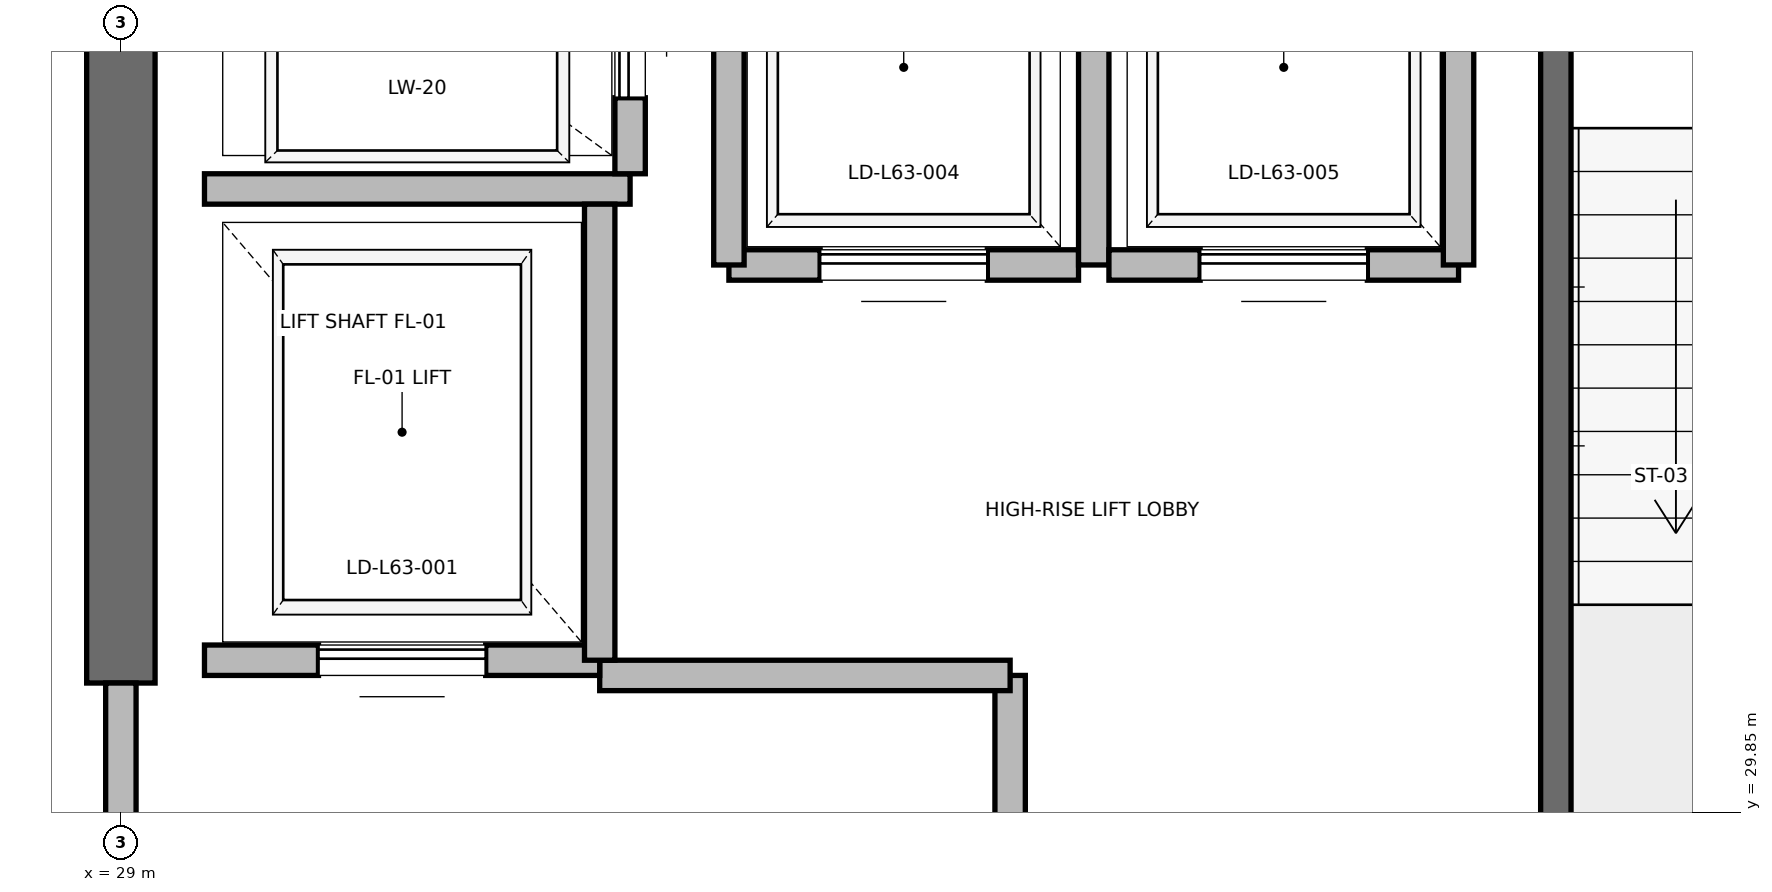
"""IFC4 building model, lengths in metres.
Left out: names, types, materials, properties, quantities, classifications, styles, units other than length and angle.
Written with IfcOpenShell. Run it as: python <this file> out.ifc"""

import sys

from ifc_helpers import new_model, si_unit, direction, frame, frame_2d, origin, place, context, subcontext, project, spatial, rectangle, extrude, element, fill, save


model = new_model("IFC4")
c1 = context("Model", 3, precision=1e-05, world=origin(), true_north=direction((0.0, 1.0)))
c2 = subcontext(c1, "Body", "Model", "MODEL_VIEW")
j1 = project(units=[si_unit("LENGTHUNIT", "METRE"), si_unit("PLANEANGLEUNIT", "RADIAN")], contexts=[c1])
p1 = place(None, origin())
s1 = spatial("IfcSite", under=j1, at=p1, CompositionType="ELEMENT")
p2 = place(p1, origin())
s2 = spatial("IfcBuilding", under=s1, at=p2, CompositionType="ELEMENT")
p3 = place(p2, frame((0.0, 0.0, 271.2)))
s3 = spatial("IfcBuildingStorey", under=s2, at=p3, CompositionType="ELEMENT", Elevation=271.2)
p4 = place(p3, frame((29.0, 30.7, 0.0), z_axis=(0.0, 0.0, 1.0), x_axis=(0.0, 1.0, 0.0)))
e1 = element("IfcWall", 1, at=p4, inside=s3, PredefinedType="SHEAR", context=c2, shape_type="SweptSolid", body=[
    extrude(rectangle(XDim=5.8, YDim=0.45, at=frame_2d((2.9, 0.0))), origin(), (0.0, 0.0, 1.0), 3.785),
])
p5 = place(p3, frame((38.44, 27.38, 0.0), z_axis=(0.0, 0.0, 1.0), x_axis=(0.0, 1.0, 0.0)))
e2 = element("IfcWall", 2, at=p5, inside=s3, PredefinedType="SOLIDWALL", context=c2, shape_type="SweptSolid", body=[
    extrude(rectangle(XDim=8.87, YDim=0.2, at=frame_2d((4.435, 0.0))), origin(), (0.0, 0.0, 1.0), 3.785),
])
p6 = place(p3, frame((34.85, 27.38, 0.0), z_axis=(0.0, 0.0, 1.0), x_axis=(0.0, 1.0, 0.0)))
e3 = element("IfcWall", 3, at=p6, inside=s3, PredefinedType="PARTITIONING", context=c2, shape_type="SweptSolid", body=[
    extrude(rectangle(XDim=3.37, YDim=0.2, at=frame_2d((1.685, 0.0))), origin(), (0.0, 0.0, 1.0), 3.785),
])
p7 = place(p6, frame((1.11, 0.0, 0.0)))
e4 = element("IfcOpeningElement", 4, at=p7, cuts=e3, PredefinedType="OPENING", context=c2, shape_type="SweptSolid", body=[
    extrude(rectangle(XDim=1.15, YDim=2.2, at=frame_2d((0.575, 1.1))), frame((0.0, 0.1, 0.0), z_axis=(0.0, -1.0, 0.0), x_axis=(1.0, 0.0, 0.0)), (0.0, 0.0, 1.0), 0.2),
])
p8 = place(p3, frame((29.0, 27.3, 0.0), z_axis=(0.0, 0.0, 1.0), x_axis=(0.0, 1.0, 0.0)))
e5 = element("IfcWall", 5, at=p8, inside=s3, PredefinedType="PARTITIONING", context=c2, shape_type="SweptSolid", body=[
    extrude(rectangle(XDim=3.4, YDim=0.2, at=frame_2d((1.7, 0.0))), origin(), (0.0, 0.0, 1.0), 2.865),
])
p9 = place(p8, frame((1.125, 0.0, 0.0)))
e6 = element("IfcOpeningElement", 6, at=p9, cuts=e5, PredefinedType="OPENING", context=c2, shape_type="SweptSolid", body=[
    extrude(rectangle(XDim=1.15, YDim=2.2, at=frame_2d((0.575, 1.1))), frame((0.0, 0.1, 0.0), z_axis=(0.0, -1.0, 0.0), x_axis=(1.0, 0.0, 0.0)), (0.0, 0.0, 1.0), 0.2),
])
p10 = place(p3, frame((32.15, 30.75, 0.0), z_axis=(0.0, 0.0, 1.0), x_axis=(1.0, 0.0, 0.0)))
e7 = element("IfcWall", 7, at=p10, inside=s3, PredefinedType="PARTITIONING", context=c2, shape_type="SweptSolid", body=[
    extrude(rectangle(XDim=2.7, YDim=0.2, at=frame_2d((1.35, 0.0))), origin(), (0.0, 0.0, 1.0), 3.785),
])
p11 = place(p3, frame((29.55, 30.85, 0.0), z_axis=(0.0, 0.0, 1.0), x_axis=(1.0, 0.0, 0.0)))
e8 = element("IfcWall", 8, at=p11, inside=s3, PredefinedType="SOLIDWALL", context=c2, shape_type="SweptSolid", body=[
    extrude(rectangle(XDim=2.6, YDim=0.2, at=frame_2d((1.3, 0.0))), origin(), (0.0, 0.0, 1.0), 2.865),
])
p12 = place(p11, frame((0.75, 0.0, 0.0)))
e9 = element("IfcOpeningElement", 9, at=p12, cuts=e8, PredefinedType="OPENING", context=c2, shape_type="SweptSolid", body=[
    extrude(rectangle(XDim=1.1, YDim=2.2, at=frame_2d((0.55, 1.1))), frame((0.0, 0.1, 0.0), z_axis=(0.0, -1.0, 0.0), x_axis=(1.0, 0.0, 0.0)), (0.0, 0.0, 1.0), 0.2),
])
p13 = place(p3, frame((29.55, 33.95, 0.0), z_axis=(0.0, 0.0, 1.0), x_axis=(1.0, 0.0, 0.0)))
e10 = element("IfcWall", 10, at=p13, inside=s3, PredefinedType="SOLIDWALL", context=c2, shape_type="SweptSolid", body=[
    extrude(rectangle(XDim=2.8, YDim=0.2, at=frame_2d((1.4, 0.0))), origin(), (0.0, 0.0, 1.0), 3.785),
])
p14 = place(p3, frame((32.15, 30.85, 0.0), z_axis=(0.0, 0.0, 1.0), x_axis=(0.0, 1.0, 0.0)))
e11 = element("IfcWall", 11, at=p14, inside=s3, PredefinedType="SOLIDWALL", context=c2, shape_type="SweptSolid", body=[
    extrude(rectangle(XDim=3.0, YDim=0.2, at=frame_2d((1.5, 0.0))), origin(), (0.0, 0.0, 1.0), 3.785),
])
p15 = place(p3, frame((32.35, 34.05, 0.0), z_axis=(0.0, 0.0, 1.0), x_axis=(0.0, 1.0, 0.0)))
e12 = element("IfcWall", 12, at=p15, inside=s3, PredefinedType="SOLIDWALL", context=c2, shape_type="SweptSolid", body=[
    extrude(rectangle(XDim=2.1, YDim=0.2, at=frame_2d((1.05, 0.0))), origin(), (0.0, 0.0, 1.0), 3.785),
])
p16 = place(p15, frame((0.5, 0.0, 0.0)))
e13 = element("IfcOpeningElement", 13, at=p16, cuts=e12, PredefinedType="OPENING", context=c2, shape_type="SweptSolid", body=[
    extrude(rectangle(XDim=1.1, YDim=2.2, at=frame_2d((0.55, 1.1))), frame((0.0, 0.1, 0.0), z_axis=(0.0, -1.0, 0.0), x_axis=(1.0, 0.0, 0.0)), (0.0, 0.0, 1.0), 0.2),
])
p17 = place(p3, frame((33.0, 33.45, 0.0), z_axis=(0.0, 0.0, 1.0), x_axis=(1.0, 0.0, 0.0)))
e14 = element("IfcWall", 14, at=p17, inside=s3, PredefinedType="SOLIDWALL", context=c2, shape_type="SweptSolid", body=[
    extrude(rectangle(XDim=2.3, YDim=0.2, at=frame_2d((1.15, 0.0))), origin(), (0.0, 0.0, 1.0), 3.785),
])
p18 = place(p17, frame((0.6, 0.0, 0.0)))
e15 = element("IfcOpeningElement", 15, at=p18, cuts=e14, PredefinedType="OPENING", context=c2, shape_type="SweptSolid", body=[
    extrude(rectangle(XDim=1.1, YDim=2.2, at=frame_2d((0.55, 1.1))), frame((0.0, 0.1, 0.0), z_axis=(0.0, -1.0, 0.0), x_axis=(1.0, 0.0, 0.0)), (0.0, 0.0, 1.0), 0.2),
])
p19 = place(p3, frame((33.0, 36.05, 0.0), z_axis=(0.0, 0.0, 1.0), x_axis=(0.0, -1.0, 0.0)))
e16 = element("IfcWall", 16, at=p19, inside=s3, PredefinedType="SOLIDWALL", context=c2, shape_type="SweptSolid", body=[
    extrude(rectangle(XDim=2.6, YDim=0.2, at=frame_2d((1.3, 0.0))), origin(), (0.0, 0.0, 1.0), 3.785),
])
p20 = place(p3, frame((35.4, 33.45, 0.0), z_axis=(0.0, 0.0, 1.0), x_axis=(0.0, 1.0, 0.0)))
e17 = element("IfcWall", 17, at=p20, inside=s3, PredefinedType="SOLIDWALL", context=c2, shape_type="SweptSolid", body=[
    extrude(rectangle(XDim=2.6, YDim=0.2, at=frame_2d((1.3, 0.0))), origin(), (0.0, 0.0, 1.0), 2.865),
])
p21 = place(p3, frame((35.5, 33.45, 0.0), z_axis=(0.0, 0.0, 1.0), x_axis=(1.0, 0.0, 0.0)))
e18 = element("IfcWall", 18, at=p21, inside=s3, PredefinedType="SOLIDWALL", context=c2, shape_type="SweptSolid", body=[
    extrude(rectangle(XDim=2.3, YDim=0.2, at=frame_2d((1.15, 0.0))), origin(), (0.0, 0.0, 1.0), 3.785),
])
p22 = place(p21, frame((0.6, 0.0, 0.0)))
e19 = element("IfcOpeningElement", 19, at=p22, cuts=e18, PredefinedType="OPENING", context=c2, shape_type="SweptSolid", body=[
    extrude(rectangle(XDim=1.1, YDim=2.2, at=frame_2d((0.55, 1.1))), frame((0.0, 0.1, 0.0), z_axis=(0.0, -1.0, 0.0), x_axis=(1.0, 0.0, 0.0)), (0.0, 0.0, 1.0), 0.2),
])
p23 = place(p3, frame((37.8, 33.45, 0.0), z_axis=(0.0, 0.0, 1.0), x_axis=(0.0, 1.0, 0.0)))
e20 = element("IfcWall", 20, at=p23, inside=s3, PredefinedType="SOLIDWALL", context=c2, shape_type="SweptSolid", body=[
    extrude(rectangle(XDim=2.6, YDim=0.2, at=frame_2d((1.3, 0.0))), origin(), (0.0, 0.0, 1.0), 2.865),
])
p24 = place(p12, origin())
e21 = element("IfcDoor", 21, at=p24, inside=s3, OperationType="SLIDING_TO_RIGHT", PredefinedType="DOOR", context=c2, shape_type="SweptSolid", body=[
    extrude(rectangle(XDim=1.1, YDim=2.2, at=frame_2d((0.55, 1.1))), frame((0.0, 0.025, 0.0), z_axis=(0.0, -1.0, 0.0), x_axis=(1.0, 0.0, 0.0)), (0.0, 0.0, 1.0), 0.05),
])
fill(e9, e21)
p25 = place(p16, origin())
e22 = element("IfcDoor", 22, at=p25, inside=s3, OperationType="SLIDING_TO_RIGHT", PredefinedType="DOOR", context=c2, shape_type="SweptSolid", body=[
    extrude(rectangle(XDim=1.1, YDim=2.2, at=frame_2d((0.55, 1.1))), frame((0.0, 0.025, 0.0), z_axis=(0.0, -1.0, 0.0), x_axis=(1.0, 0.0, 0.0)), (0.0, 0.0, 1.0), 0.05),
])
fill(e13, e22)
p26 = place(p18, origin())
e23 = element("IfcDoor", 23, at=p26, inside=s3, OperationType="SLIDING_TO_RIGHT", PredefinedType="DOOR", context=c2, shape_type="SweptSolid", body=[
    extrude(rectangle(XDim=1.1, YDim=2.2, at=frame_2d((0.55, 1.1))), frame((0.0, 0.025, 0.0), z_axis=(0.0, -1.0, 0.0), x_axis=(1.0, 0.0, 0.0)), (0.0, 0.0, 1.0), 0.05),
])
fill(e15, e23)
p27 = place(p22, origin())
e24 = element("IfcDoor", 24, at=p27, inside=s3, OperationType="SLIDING_TO_RIGHT", PredefinedType="DOOR", context=c2, shape_type="SweptSolid", body=[
    extrude(rectangle(XDim=1.1, YDim=2.2, at=frame_2d((0.55, 1.1))), frame((0.0, 0.025, 0.0), z_axis=(0.0, -1.0, 0.0), x_axis=(1.0, 0.0, 0.0)), (0.0, 0.0, 1.0), 0.05),
])
fill(e19, e24)
save(model, sys.argv[1])
